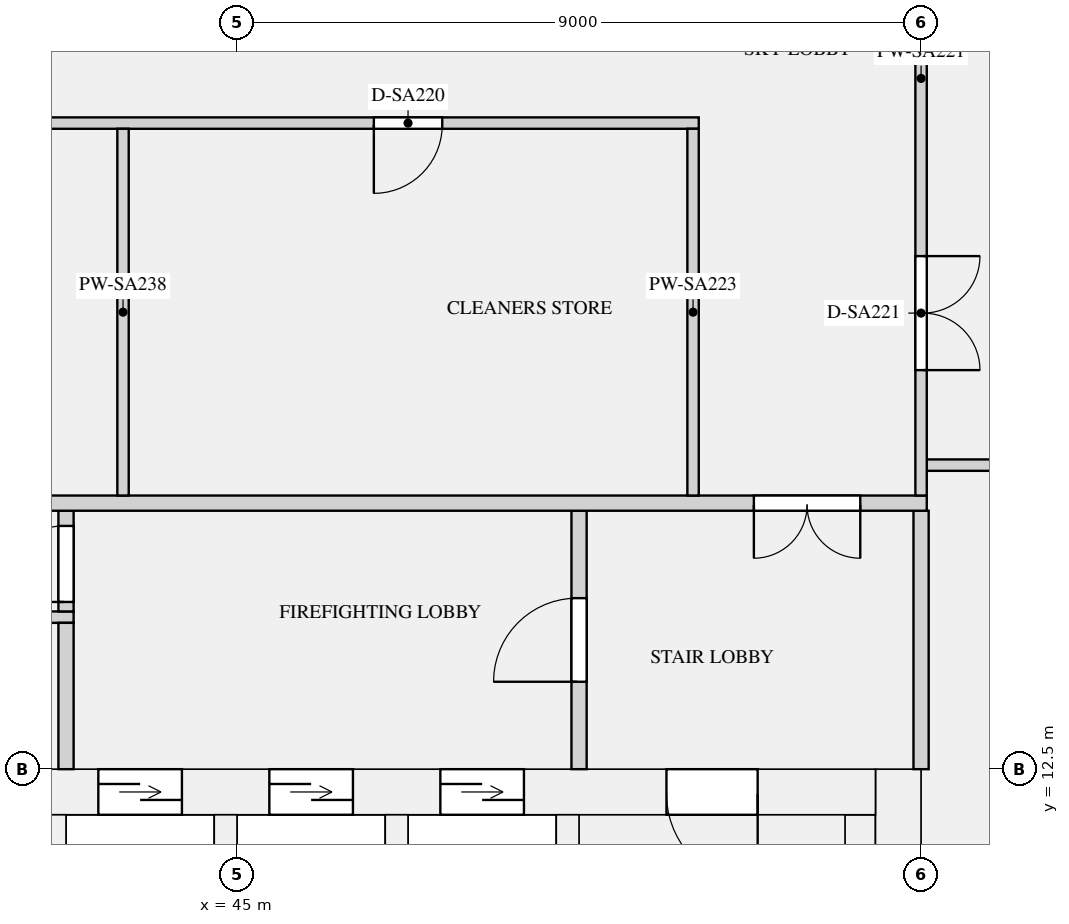
"""IFC4 building model, lengths in metres.
Left out: names, types, materials, properties, quantities, classifications, styles, units other than length and angle.
Written with IfcOpenShell. Run it as: python <this file> out.ifc"""

import sys

from ifc_helpers import new_model, si_unit, direction, frame, frame_2d, origin, place, context, subcontext, project, spatial, rectangle, extrude, element, fill, save


model = new_model("IFC4")
c1 = context("Model", 3, precision=1e-05, world=origin(), true_north=direction((0.0, 1.0)))
c2 = subcontext(c1, "Body", "Model", "MODEL_VIEW")
j1 = project(units=[si_unit("LENGTHUNIT", "METRE"), si_unit("PLANEANGLEUNIT", "RADIAN")], contexts=[c1])
p1 = place(None, origin())
s1 = spatial("IfcSite", under=j1, at=p1, CompositionType="ELEMENT")
p2 = place(p1, origin())
s2 = spatial("IfcBuilding", under=s1, at=p2, CompositionType="ELEMENT")
p3 = place(p2, frame((0.0, 0.0, 191.7)))
s3 = spatial("IfcBuildingStorey", under=s2, at=p3, CompositionType="ELEMENT", Elevation=191.7)
p4 = place(p3, frame((53.7, 0.0, 0.0), z_axis=(0.0, 0.0, 1.0), x_axis=(0.0, 1.0, 0.0)))
e1 = element("IfcWall", 1, at=p4, inside=s3, PredefinedType="SHEAR", context=c2, shape_type="SweptSolid", body=[
    extrude(rectangle(XDim=12.5, YDim=0.6, at=frame_2d((6.25, 0.0))), origin(), (0.0, 0.0, 1.0), 6.3),
])
p5 = place(p3, frame((18.6, 12.2, 0.0), z_axis=(0.0, 0.0, 1.0), x_axis=(1.0, 0.0, 0.0)))
e2 = element("IfcWall", 2, at=p5, inside=s3, PredefinedType="SHEAR", context=c2, shape_type="SweptSolid", body=[
    extrude(rectangle(XDim=34.8, YDim=0.6, at=frame_2d((17.4, 0.0))), origin(), (0.0, 0.0, 1.0), 6.3),
])
p6 = place(p5, frame((24.575, 0.0, 0.0)))
e3 = element("IfcOpeningElement", 3, at=p6, cuts=e2, PredefinedType="OPENING", context=c2, shape_type="SweptSolid", body=[
    extrude(rectangle(XDim=1.1, YDim=2.1, at=frame_2d((0.55, 1.05))), frame((0.0, 0.31, 0.0), z_axis=(0.0, -1.0, 0.0), x_axis=(1.0, 0.0, 0.0)), (0.0, 0.0, 1.0), 0.62),
])
p7 = place(p5, frame((26.825, 0.0, 0.0)))
e4 = element("IfcOpeningElement", 4, at=p7, cuts=e2, PredefinedType="OPENING", context=c2, shape_type="SweptSolid", body=[
    extrude(rectangle(XDim=1.1, YDim=2.1, at=frame_2d((0.55, 1.05))), frame((0.0, 0.31, 0.0), z_axis=(0.0, -1.0, 0.0), x_axis=(1.0, 0.0, 0.0)), (0.0, 0.0, 1.0), 0.62),
])
p8 = place(p5, frame((29.075, 0.0, 0.0)))
e5 = element("IfcOpeningElement", 5, at=p8, cuts=e2, PredefinedType="OPENING", context=c2, shape_type="SweptSolid", body=[
    extrude(rectangle(XDim=1.1, YDim=2.1, at=frame_2d((0.55, 1.05))), frame((0.0, 0.31, 0.0), z_axis=(0.0, -1.0, 0.0), x_axis=(1.0, 0.0, 0.0)), (0.0, 0.0, 1.0), 0.62),
])
p9 = place(p5, frame((4.65, 0.0, 0.0)))
e6 = element("IfcOpeningElement", 6, at=p9, cuts=e2, PredefinedType="OPENING", context=c2, shape_type="SweptSolid", body=[
    extrude(rectangle(XDim=0.9, YDim=2.1, at=frame_2d((0.45, 1.05))), frame((0.0, 0.31, 0.0), z_axis=(0.0, -1.0, 0.0), x_axis=(1.0, 0.0, 0.0)), (0.0, 0.0, 1.0), 0.62),
])
p10 = place(p5, frame((1.55, 0.0, 0.0)))
e7 = element("IfcOpeningElement", 7, at=p10, cuts=e2, PredefinedType="OPENING", context=c2, shape_type="SweptSolid", body=[
    extrude(rectangle(XDim=1.2, YDim=2.1, at=frame_2d((0.6, 1.05))), frame((0.0, 0.31, 0.0), z_axis=(0.0, -1.0, 0.0), x_axis=(1.0, 0.0, 0.0)), (0.0, 0.0, 1.0), 0.62),
])
p11 = place(p5, frame((32.05, 0.0, 0.0)))
e8 = element("IfcOpeningElement", 8, at=p11, cuts=e2, PredefinedType="OPENING", context=c2, shape_type="SweptSolid", body=[
    extrude(rectangle(XDim=1.2, YDim=2.1, at=frame_2d((0.6, 1.05))), frame((0.0, 0.31, 0.0), z_axis=(0.0, -1.0, 0.0), x_axis=(1.0, 0.0, 0.0)), (0.0, 0.0, 1.0), 0.62),
])
p12 = place(p3, frame((53.2, 1.0, 0.0), z_axis=(0.0, 0.0, 1.0), x_axis=(0.0, 1.0, 0.0)))
e9 = element("IfcWall", 9, at=p12, inside=s3, PredefinedType="SHEAR", context=c2, shape_type="SweptSolid", body=[
    extrude(rectangle(XDim=10.9, YDim=0.4, at=frame_2d((5.45, 0.0))), origin(), (0.0, 0.0, 1.0), 6.3),
])
for number, where, z_axis, x_axis in (
    (10, (42.6, 8.25, 0.0), (0.0, 0.0, 1.0), (0.0, 1.0, 0.0)),
    (11, (44.85, 8.25, 0.0), (0.0, 0.0, 1.0), (0.0, 1.0, 0.0)),
    (12, (47.1, 8.25, 0.0), (0.0, 0.0, 1.0), (0.0, 1.0, 0.0)),
    (13, (49.35, 8.25, 0.0), (0.0, 0.0, 1.0), (0.0, 1.0, 0.0)),
):
    element("IfcWall", number, at=place(p3, frame(where, z_axis=z_axis, x_axis=x_axis)), inside=s3, PredefinedType="SHEAR", context=c2, shape_type="SweptSolid", body=[
        extrude(rectangle(XDim=3.65, YDim=0.3, at=frame_2d((1.825, 0.0))), origin(), (0.0, 0.0, 1.0), 6.3),
    ])
p13 = place(p3, frame((38.925, 14.5, 0.0), z_axis=(0.0, 0.0, 1.0), x_axis=(1.0, 0.0, 0.0)))
e14 = element("IfcWall", 14, at=p13, inside=s3, PredefinedType="PARTITIONING", context=c2, shape_type="SweptSolid", body=[
    extrude(rectangle(XDim=3.925, YDim=0.15, at=frame_2d((1.962, 0.0))), origin(), (0.0, 0.0, 1.0), 5.98),
])
p14 = place(p13, frame((0.575, 0.0, 0.0)))
e15 = element("IfcOpeningElement", 15, at=p14, cuts=e14, PredefinedType="OPENING", context=c2, shape_type="SweptSolid", body=[
    extrude(rectangle(XDim=0.9, YDim=2.1, at=frame_2d((0.45, 1.05))), frame((0.0, 0.085, 0.0), z_axis=(0.0, -1.0, 0.0), x_axis=(1.0, 0.0, 0.0)), (0.0, 0.0, 1.0), 0.17),
])
p15 = place(p13, frame((2.45, 0.0, 0.0)))
e16 = element("IfcOpeningElement", 16, at=p15, cuts=e14, PredefinedType="OPENING", context=c2, shape_type="SweptSolid", body=[
    extrude(rectangle(XDim=0.9, YDim=2.1, at=frame_2d((0.45, 1.05))), frame((0.0, 0.085, 0.0), z_axis=(0.0, -1.0, 0.0), x_axis=(1.0, 0.0, 0.0)), (0.0, 0.0, 1.0), 0.17),
])
p16 = place(p3, frame((42.75, 12.5, 0.0), z_axis=(0.0, 0.0, 1.0), x_axis=(0.0, 1.0, 0.0)))
e17 = element("IfcWall", 17, at=p16, inside=s3, PredefinedType="PARTITIONING", context=c2, shape_type="SweptSolid", body=[
    extrude(rectangle(XDim=1.925, YDim=0.2, at=frame_2d((0.962, 0.0))), origin(), (0.0, 0.0, 1.0), 5.98),
])
p17 = place(p3, frame((49.5, 12.5, 0.0), z_axis=(0.0, 0.0, 1.0), x_axis=(0.0, 1.0, 0.0)))
e18 = element("IfcWall", 18, at=p17, inside=s3, PredefinedType="PARTITIONING", context=c2, shape_type="SweptSolid", body=[
    extrude(rectangle(XDim=3.4, YDim=0.2, at=frame_2d((1.7, 0.0))), origin(), (0.0, 0.0, 1.0), 5.98),
])
p18 = place(p17, frame((1.15, 0.0, 0.0)))
e19 = element("IfcOpeningElement", 19, at=p18, cuts=e18, PredefinedType="OPENING", context=c2, shape_type="SweptSolid", body=[
    extrude(rectangle(XDim=1.1, YDim=2.1, at=frame_2d((0.55, 1.05))), frame((0.0, 0.11, 0.0), z_axis=(0.0, -1.0, 0.0), x_axis=(1.0, 0.0, 0.0)), (0.0, 0.0, 1.0), 0.22),
])
p19 = place(p3, frame((54.0, 12.5, 0.0), z_axis=(0.0, 0.0, 1.0), x_axis=(0.0, 1.0, 0.0)))
e20 = element("IfcWall", 20, at=p19, inside=s3, PredefinedType="PARTITIONING", context=c2, shape_type="SweptSolid", body=[
    extrude(rectangle(XDim=3.4, YDim=0.2, at=frame_2d((1.7, 0.0))), origin(), (0.0, 0.0, 1.0), 5.98),
])
p20 = place(p3, frame((42.75, 14.575, 0.0), z_axis=(0.0, 0.0, 1.0), x_axis=(0.0, 1.0, 0.0)))
e21 = element("IfcWall", 21, at=p20, inside=s3, PredefinedType="PARTITIONING", context=c2, shape_type="SweptSolid", body=[
    extrude(rectangle(XDim=1.325, YDim=0.2, at=frame_2d((0.663, 0.0))), origin(), (0.0, 0.0, 1.0), 5.98),
])
p21 = place(p20, frame((0.125, 0.0, 0.0)))
e22 = element("IfcOpeningElement", 22, at=p21, cuts=e21, PredefinedType="OPENING", context=c2, shape_type="SweptSolid", body=[
    extrude(rectangle(XDim=1.0, YDim=2.1, at=frame_2d((0.5, 1.05))), frame((0.0, 0.11, 0.0), z_axis=(0.0, -1.0, 0.0), x_axis=(1.0, 0.0, 0.0)), (0.0, 0.0, 1.0), 0.22),
])
p22 = place(p3, frame((20.925, 21.0, 0.0), z_axis=(0.0, 0.0, 1.0), x_axis=(1.0, 0.0, 0.0)))
e23 = element("IfcWall", 23, at=p22, inside=s3, PredefinedType="PARTITIONING", context=c2, shape_type="SweptSolid", body=[
    extrude(rectangle(XDim=30.15, YDim=0.15, at=frame_2d((15.075, 0.0))), origin(), (0.0, 0.0, 1.0), 5.98),
])
p23 = place(p22, frame((8.375, 0.0, 0.0)))
e24 = element("IfcOpeningElement", 24, at=p23, cuts=e23, PredefinedType="OPENING", context=c2, shape_type="SweptSolid", body=[
    extrude(rectangle(XDim=0.9, YDim=2.1, at=frame_2d((0.45, 1.05))), frame((0.0, 0.085, 0.0), z_axis=(0.0, -1.0, 0.0), x_axis=(1.0, 0.0, 0.0)), (0.0, 0.0, 1.0), 0.17),
])
p24 = place(p22, frame((14.625, 0.0, 0.0)))
e25 = element("IfcOpeningElement", 25, at=p24, cuts=e23, PredefinedType="OPENING", context=c2, shape_type="SweptSolid", body=[
    extrude(rectangle(XDim=0.9, YDim=2.1, at=frame_2d((0.45, 1.05))), frame((0.0, 0.085, 0.0), z_axis=(0.0, -1.0, 0.0), x_axis=(1.0, 0.0, 0.0)), (0.0, 0.0, 1.0), 0.17),
])
p25 = place(p22, frame((19.375, 0.0, 0.0)))
e26 = element("IfcOpeningElement", 26, at=p25, cuts=e23, PredefinedType="OPENING", context=c2, shape_type="SweptSolid", body=[
    extrude(rectangle(XDim=0.9, YDim=2.1, at=frame_2d((0.45, 1.05))), frame((0.0, 0.085, 0.0), z_axis=(0.0, -1.0, 0.0), x_axis=(1.0, 0.0, 0.0)), (0.0, 0.0, 1.0), 0.17),
])
p26 = place(p22, frame((25.875, 0.0, 0.0)))
e27 = element("IfcOpeningElement", 27, at=p26, cuts=e23, PredefinedType="OPENING", context=c2, shape_type="SweptSolid", body=[
    extrude(rectangle(XDim=0.9, YDim=2.1, at=frame_2d((0.45, 1.05))), frame((0.0, 0.085, 0.0), z_axis=(0.0, -1.0, 0.0), x_axis=(1.0, 0.0, 0.0)), (0.0, 0.0, 1.0), 0.17),
])
p27 = place(p3, frame((54.075, 16.5, 0.0), z_axis=(0.0, 0.0, 1.0), x_axis=(1.0, 0.0, 0.0)))
e28 = element("IfcWall", 28, at=p27, inside=s3, PredefinedType="PARTITIONING", context=c2, shape_type="SweptSolid", body=[
    extrude(rectangle(XDim=14.775, YDim=0.15, at=frame_2d((7.388, 0.0))), origin(), (0.0, 0.0, 1.0), 5.98),
])
p28 = place(p27, frame((1.425, 0.0, 0.0)))
e29 = element("IfcOpeningElement", 29, at=p28, cuts=e28, PredefinedType="OPENING", context=c2, shape_type="SweptSolid", body=[
    extrude(rectangle(XDim=1.5, YDim=2.1, at=frame_2d((0.75, 1.05))), frame((0.0, 0.085, 0.0), z_axis=(0.0, -1.0, 0.0), x_axis=(1.0, 0.0, 0.0)), (0.0, 0.0, 1.0), 0.17),
])
p29 = place(p3, frame((17.925, 16.0, 0.0), z_axis=(0.0, 0.0, 1.0), x_axis=(1.0, 0.0, 0.0)))
e30 = element("IfcWall", 30, at=p29, inside=s3, PredefinedType="PARTITIONING", context=c2, shape_type="SweptSolid", body=[
    extrude(rectangle(XDim=36.15, YDim=0.2, at=frame_2d((18.075, 0.0))), origin(), (0.0, 0.0, 1.0), 5.98),
])
p30 = place(p29, frame((0.875, 0.0, 0.0)))
e31 = element("IfcOpeningElement", 31, at=p30, cuts=e30, PredefinedType="OPENING", context=c2, shape_type="SweptSolid", body=[
    extrude(rectangle(XDim=1.4, YDim=2.1, at=frame_2d((0.7, 1.05))), frame((0.0, 0.11, 0.0), z_axis=(0.0, -1.0, 0.0), x_axis=(1.0, 0.0, 0.0)), (0.0, 0.0, 1.0), 0.22),
])
p31 = place(p29, frame((33.875, 0.0, 0.0)))
e32 = element("IfcOpeningElement", 32, at=p31, cuts=e30, PredefinedType="OPENING", context=c2, shape_type="SweptSolid", body=[
    extrude(rectangle(XDim=1.4, YDim=2.1, at=frame_2d((0.7, 1.05))), frame((0.0, 0.11, 0.0), z_axis=(0.0, -1.0, 0.0), x_axis=(1.0, 0.0, 0.0)), (0.0, 0.0, 1.0), 0.22),
])
p32 = place(p3, frame((54.0, 16.1, 0.0), z_axis=(0.0, 0.0, 1.0), x_axis=(0.0, 1.0, 0.0)))
e33 = element("IfcWall", 33, at=p32, inside=s3, PredefinedType="PARTITIONING", context=c2, shape_type="SweptSolid", body=[
    extrude(rectangle(XDim=7.825, YDim=0.15, at=frame_2d((3.913, 0.0))), origin(), (0.0, 0.0, 1.0), 5.98),
])
p33 = place(p32, frame((1.65, 0.0, 0.0)))
e34 = element("IfcOpeningElement", 34, at=p33, cuts=e33, PredefinedType="OPENING", context=c2, shape_type="SweptSolid", body=[
    extrude(rectangle(XDim=1.5, YDim=2.1, at=frame_2d((0.75, 1.05))), frame((0.0, 0.085, 0.0), z_axis=(0.0, -1.0, 0.0), x_axis=(1.0, 0.0, 0.0)), (0.0, 0.0, 1.0), 0.17),
])
for number, where, z_axis, x_axis in (
    (35, (51.0, 16.1, 0.0), (0.0, 0.0, 1.0), (0.0, 1.0, 0.0)),
    (36, (43.5, 16.1, 0.0), (0.0, 0.0, 1.0), (0.0, 1.0, 0.0)),
):
    element("IfcWall", number, at=place(p3, frame(where, z_axis=z_axis, x_axis=x_axis)), inside=s3, PredefinedType="PARTITIONING", context=c2, shape_type="SweptSolid", body=[
        extrude(rectangle(XDim=4.825, YDim=0.15, at=frame_2d((2.413, 0.0))), origin(), (0.0, 0.0, 1.0), 5.98),
    ])
p34 = place(p6, origin())
e37 = element("IfcDoor", 37, at=p34, inside=s3, OperationType="DOUBLE_DOOR_SLIDING", PredefinedType="DOOR", context=c2, shape_type="SweptSolid", body=[
    extrude(rectangle(XDim=1.1, YDim=2.1, at=frame_2d((0.55, 1.05))), frame((0.0, 0.025, 0.0), z_axis=(0.0, -1.0, 0.0), x_axis=(1.0, 0.0, 0.0)), (0.0, 0.0, 1.0), 0.05),
])
fill(e3, e37)
p35 = place(p7, origin())
e38 = element("IfcDoor", 38, at=p35, inside=s3, OperationType="DOUBLE_DOOR_SLIDING", PredefinedType="DOOR", context=c2, shape_type="SweptSolid", body=[
    extrude(rectangle(XDim=1.1, YDim=2.1, at=frame_2d((0.55, 1.05))), frame((0.0, 0.025, 0.0), z_axis=(0.0, -1.0, 0.0), x_axis=(1.0, 0.0, 0.0)), (0.0, 0.0, 1.0), 0.05),
])
fill(e4, e38)
p36 = place(p8, origin())
e39 = element("IfcDoor", 39, at=p36, inside=s3, OperationType="DOUBLE_DOOR_SLIDING", PredefinedType="DOOR", context=c2, shape_type="SweptSolid", body=[
    extrude(rectangle(XDim=1.1, YDim=2.1, at=frame_2d((0.55, 1.05))), frame((0.0, 0.025, 0.0), z_axis=(0.0, -1.0, 0.0), x_axis=(1.0, 0.0, 0.0)), (0.0, 0.0, 1.0), 0.05),
])
fill(e5, e39)
p37 = place(p11, frame((1.2, 0.0, 0.0), z_axis=(0.0, 0.0, 1.0), x_axis=(-1.0, 0.0, 0.0)))
e40 = element("IfcDoor", 40, at=p37, inside=s3, OperationType="SINGLE_SWING_LEFT", PredefinedType="DOOR", context=c2, shape_type="SweptSolid", body=[
    extrude(rectangle(XDim=1.2, YDim=2.1, at=frame_2d((0.6, 1.05))), frame((0.0, 0.025, 0.0), z_axis=(0.0, -1.0, 0.0), x_axis=(1.0, 0.0, 0.0)), (0.0, 0.0, 1.0), 0.05),
])
fill(e8, e40)
p38 = place(p21, origin())
e41 = element("IfcDoor", 41, at=p38, inside=s3, OperationType="SINGLE_SWING_LEFT", PredefinedType="DOOR", context=c2, shape_type="SweptSolid", body=[
    extrude(rectangle(XDim=1.0, YDim=2.1, at=frame_2d((0.5, 1.05))), frame((0.0, 0.025, 0.0), z_axis=(0.0, -1.0, 0.0), x_axis=(1.0, 0.0, 0.0)), (0.0, 0.0, 1.0), 0.05),
])
fill(e22, e41)
p39 = place(p18, origin())
e42 = element("IfcDoor", 42, at=p39, inside=s3, OperationType="SINGLE_SWING_LEFT", PredefinedType="DOOR", context=c2, shape_type="SweptSolid", body=[
    extrude(rectangle(XDim=1.1, YDim=2.1, at=frame_2d((0.55, 1.05))), frame((0.0, 0.025, 0.0), z_axis=(0.0, -1.0, 0.0), x_axis=(1.0, 0.0, 0.0)), (0.0, 0.0, 1.0), 0.05),
])
fill(e19, e42)
p40 = place(p31, frame((1.4, 0.0, 0.0), z_axis=(0.0, 0.0, 1.0), x_axis=(-1.0, 0.0, 0.0)))
e43 = element("IfcDoor", 43, at=p40, inside=s3, OperationType="DOUBLE_DOOR_SINGLE_SWING", PredefinedType="DOOR", context=c2, shape_type="SweptSolid", body=[
    extrude(rectangle(XDim=1.4, YDim=2.1, at=frame_2d((0.7, 1.05))), frame((0.0, 0.025, 0.0), z_axis=(0.0, -1.0, 0.0), x_axis=(1.0, 0.0, 0.0)), (0.0, 0.0, 1.0), 0.05),
])
fill(e32, e43)
p41 = place(p26, frame((0.9, 0.0, 0.0), z_axis=(0.0, 0.0, 1.0), x_axis=(-1.0, 0.0, 0.0)))
e44 = element("IfcDoor", 44, at=p41, inside=s3, OperationType="SINGLE_SWING_RIGHT", PredefinedType="DOOR", context=c2, shape_type="SweptSolid", body=[
    extrude(rectangle(XDim=0.9, YDim=2.1, at=frame_2d((0.45, 1.05))), frame((0.0, 0.025, 0.0), z_axis=(0.0, -1.0, 0.0), x_axis=(1.0, 0.0, 0.0)), (0.0, 0.0, 1.0), 0.05),
])
fill(e27, e44)
p42 = place(p33, frame((1.5, 0.0, 0.0), z_axis=(0.0, 0.0, 1.0), x_axis=(-1.0, 0.0, 0.0)))
e45 = element("IfcDoor", 45, at=p42, inside=s3, OperationType="DOUBLE_DOOR_SINGLE_SWING", PredefinedType="DOOR", context=c2, shape_type="SweptSolid", body=[
    extrude(rectangle(XDim=1.5, YDim=2.1, at=frame_2d((0.75, 1.05))), frame((0.0, 0.025, 0.0), z_axis=(0.0, -1.0, 0.0), x_axis=(1.0, 0.0, 0.0)), (0.0, 0.0, 1.0), 0.05),
])
fill(e34, e45)
save(model, sys.argv[1])
